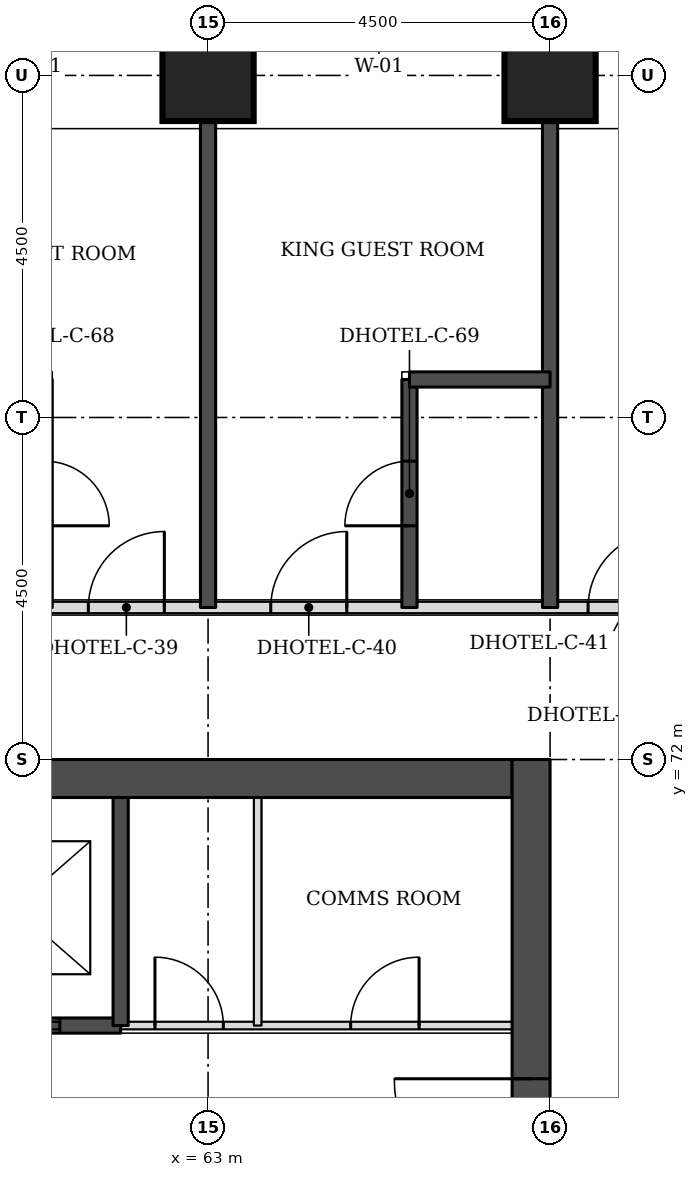
"""IFC4 building model, lengths in metres.
Left out: names, types, materials, properties, quantities, classifications, styles, units other than length and angle.
Written with IfcOpenShell. Run it as: python <this file> out.ifc"""

import sys

from ifc_helpers import new_model, si_unit, direction, frame, frame_2d, origin, origin_2d, place, context, subcontext, project, spatial, rectangle, extrude, element, fill, save


model = new_model("IFC4")
c1 = context("Model", 3, precision=1e-05, world=origin(), true_north=direction((0.0, 1.0)))
c2 = subcontext(c1, "Body", "Model", "MODEL_VIEW")
j1 = project(units=[si_unit("LENGTHUNIT", "METRE"), si_unit("PLANEANGLEUNIT", "RADIAN")], contexts=[c1])
p1 = place(None, origin())
s1 = spatial("IfcSite", under=j1, at=p1, CompositionType="ELEMENT")
p2 = place(p1, origin())
s2 = spatial("IfcBuilding", under=s1, at=p2, CompositionType="ELEMENT")
p3 = place(p2, frame((0.0, 0.0, 33.0)))
s3 = spatial("IfcBuildingStorey", under=s2, at=p3, CompositionType="ELEMENT", Elevation=33.0)
for number, where, z_axis, x_axis in (
    (1, (63.0, 81.0, 0.0), (0.0, 0.0, 1.0), (1.0, 0.0, 0.0)),
    (2, (67.5, 81.0, 0.0), (0.0, 0.0, 1.0), (1.0, 0.0, 0.0)),
):
    element("IfcColumn", number, at=place(p3, frame(where, z_axis=z_axis, x_axis=x_axis)), inside=s3, PredefinedType="COLUMN", context=c2, shape_type="SweptSolid", body=[
        extrude(rectangle(XDim=1.2, YDim=1.2, at=origin_2d()), origin(), (0.0, 0.0, 1.0), 3.3),
    ])
p4 = place(p3, frame((45.5, 71.75, 0.0), z_axis=(0.0, 0.0, 1.0), x_axis=(1.0, 0.0, 0.0)))
e3 = element("IfcWall", 3, at=p4, inside=s3, PredefinedType="SHEAR", context=c2, shape_type="SweptSolid", body=[
    extrude(rectangle(XDim=21.5, YDim=0.5, at=frame_2d((10.75, 0.0))), origin(), (0.0, 0.0, 1.0), 3.3),
])
p5 = place(p3, frame((67.25, 49.5, 0.0), z_axis=(0.0, 0.0, 1.0), x_axis=(0.0, 1.0, 0.0)))
e4 = element("IfcWall", 4, at=p5, inside=s3, PredefinedType="SHEAR", context=c2, shape_type="SweptSolid", body=[
    extrude(rectangle(XDim=22.5, YDim=0.5, at=frame_2d((11.25, 0.0))), origin(), (0.0, 0.0, 1.0), 3.3),
])
p6 = place(p5, frame((4.2, 0.0, 0.0)))
e5 = element("IfcOpeningElement", 5, at=p6, cuts=e4, PredefinedType="OPENING", context=c2, shape_type="SweptSolid", body=[
    extrude(rectangle(XDim=1.8, YDim=2.1, at=frame_2d((0.9, 1.05))), frame((0.0, 0.26, 0.0), z_axis=(0.0, -1.0, 0.0), x_axis=(1.0, 0.0, 0.0)), (0.0, 0.0, 1.0), 0.52),
])
p7 = place(p5, frame((6.9, 0.0, 0.0)))
e6 = element("IfcOpeningElement", 6, at=p7, cuts=e4, PredefinedType="OPENING", context=c2, shape_type="SweptSolid", body=[
    extrude(rectangle(XDim=1.1, YDim=2.1, at=frame_2d((0.55, 1.05))), frame((0.0, 0.26, 0.0), z_axis=(0.0, -1.0, 0.0), x_axis=(1.0, 0.0, 0.0)), (0.0, 0.0, 1.0), 0.52),
])
p8 = place(p5, frame((13.6, 0.0, 0.0)))
e7 = element("IfcOpeningElement", 7, at=p8, cuts=e4, PredefinedType="OPENING", context=c2, shape_type="SweptSolid", body=[
    extrude(rectangle(XDim=1.1, YDim=2.1, at=frame_2d((0.55, 1.05))), frame((0.0, 0.26, 0.0), z_axis=(0.0, -1.0, 0.0), x_axis=(1.0, 0.0, 0.0)), (0.0, 0.0, 1.0), 0.52),
])
p9 = place(p5, frame((16.5, 0.0, 0.0)))
e8 = element("IfcOpeningElement", 8, at=p9, cuts=e4, PredefinedType="OPENING", context=c2, shape_type="SweptSolid", body=[
    extrude(rectangle(XDim=1.8, YDim=2.1, at=frame_2d((0.9, 1.05))), frame((0.0, 0.26, 0.0), z_axis=(0.0, -1.0, 0.0), x_axis=(1.0, 0.0, 0.0)), (0.0, 0.0, 1.0), 0.52),
])
p10 = place(p3, frame((43.0, 74.0, 0.0), z_axis=(0.0, 0.0, 1.0), x_axis=(1.0, 0.0, 0.0)))
e9 = element("IfcWall", 9, at=p10, inside=s3, PredefinedType="PARTITIONING", context=c2, shape_type="SweptSolid", body=[
    extrude(rectangle(XDim=26.5, YDim=0.15, at=frame_2d((13.25, 0.0))), origin(), (0.0, 0.0, 1.0), 3.08),
])
p11 = place(p10, frame((2.825, 0.0, 0.0)))
e10 = element("IfcOpeningElement", 10, at=p11, cuts=e9, PredefinedType="OPENING", context=c2, shape_type="SweptSolid", body=[
    extrude(rectangle(XDim=1.0, YDim=2.1, at=frame_2d((0.5, 1.05))), frame((0.0, 0.085, 0.0), z_axis=(0.0, -1.0, 0.0), x_axis=(1.0, 0.0, 0.0)), (0.0, 0.0, 1.0), 0.17),
])
p12 = place(p10, frame((9.425, 0.0, 0.0)))
e11 = element("IfcOpeningElement", 11, at=p12, cuts=e9, PredefinedType="OPENING", context=c2, shape_type="SweptSolid", body=[
    extrude(rectangle(XDim=1.0, YDim=2.1, at=frame_2d((0.5, 1.05))), frame((0.0, 0.085, 0.0), z_axis=(0.0, -1.0, 0.0), x_axis=(1.0, 0.0, 0.0)), (0.0, 0.0, 1.0), 0.17),
])
p13 = place(p10, frame((11.825, 0.0, 0.0)))
e12 = element("IfcOpeningElement", 12, at=p13, cuts=e9, PredefinedType="OPENING", context=c2, shape_type="SweptSolid", body=[
    extrude(rectangle(XDim=1.0, YDim=2.1, at=frame_2d((0.5, 1.05))), frame((0.0, 0.085, 0.0), z_axis=(0.0, -1.0, 0.0), x_axis=(1.0, 0.0, 0.0)), (0.0, 0.0, 1.0), 0.17),
])
p14 = place(p10, frame((18.425, 0.0, 0.0)))
e13 = element("IfcOpeningElement", 13, at=p14, cuts=e9, PredefinedType="OPENING", context=c2, shape_type="SweptSolid", body=[
    extrude(rectangle(XDim=1.0, YDim=2.1, at=frame_2d((0.5, 1.05))), frame((0.0, 0.085, 0.0), z_axis=(0.0, -1.0, 0.0), x_axis=(1.0, 0.0, 0.0)), (0.0, 0.0, 1.0), 0.17),
])
p15 = place(p10, frame((20.825, 0.0, 0.0)))
e14 = element("IfcOpeningElement", 14, at=p15, cuts=e9, PredefinedType="OPENING", context=c2, shape_type="SweptSolid", body=[
    extrude(rectangle(XDim=1.0, YDim=2.1, at=frame_2d((0.5, 1.05))), frame((0.0, 0.085, 0.0), z_axis=(0.0, -1.0, 0.0), x_axis=(1.0, 0.0, 0.0)), (0.0, 0.0, 1.0), 0.17),
])
p16 = place(p10, frame((0.5, 0.0, 0.0)))
e15 = element("IfcOpeningElement", 15, at=p16, cuts=e9, PredefinedType="OPENING", context=c2, shape_type="SweptSolid", body=[
    extrude(rectangle(XDim=1.0, YDim=2.1, at=frame_2d((0.5, 1.05))), frame((0.0, 0.085, 0.0), z_axis=(0.0, -1.0, 0.0), x_axis=(1.0, 0.0, 0.0)), (0.0, 0.0, 1.0), 0.17),
])
p17 = place(p10, frame((25.0, 0.0, 0.0)))
e16 = element("IfcOpeningElement", 16, at=p17, cuts=e9, PredefinedType="OPENING", context=c2, shape_type="SweptSolid", body=[
    extrude(rectangle(XDim=1.0, YDim=2.1, at=frame_2d((0.5, 1.05))), frame((0.0, 0.085, 0.0), z_axis=(0.0, -1.0, 0.0), x_axis=(1.0, 0.0, 0.0)), (0.0, 0.0, 1.0), 0.17),
])
p18 = place(p3, frame((60.85, 74.0, 0.0), z_axis=(0.0, 0.0, 1.0), x_axis=(0.0, 1.0, 0.0)))
e17 = element("IfcWall", 17, at=p18, inside=s3, PredefinedType="SOLIDWALL", context=c2, shape_type="SweptSolid", body=[
    extrude(rectangle(XDim=3.0, YDim=0.2, at=frame_2d((1.5, 0.0))), origin(), (0.0, 0.0, 1.0), 3.08),
])
p19 = place(p18, frame((1.075, 0.0, 0.0)))
e18 = element("IfcOpeningElement", 18, at=p19, cuts=e17, PredefinedType="OPENING", context=c2, shape_type="SweptSolid", body=[
    extrude(rectangle(XDim=0.85, YDim=2.1, at=frame_2d((0.425, 1.05))), frame((0.0, 0.11, 0.0), z_axis=(0.0, -1.0, 0.0), x_axis=(1.0, 0.0, 0.0)), (0.0, 0.0, 1.0), 0.22),
])
p20 = place(p3, frame((63.0, 74.0, 0.0), z_axis=(0.0, 0.0, 1.0), x_axis=(0.0, 1.0, 0.0)))
e19 = element("IfcWall", 19, at=p20, inside=s3, PredefinedType="SOLIDWALL", context=c2, shape_type="SweptSolid", body=[
    extrude(rectangle(XDim=6.4, YDim=0.2, at=frame_2d((3.2, 0.0))), origin(), (0.0, 0.0, 1.0), 3.08),
])
p21 = place(p3, frame((65.65, 74.0, 0.0), z_axis=(0.0, 0.0, 1.0), x_axis=(0.0, 1.0, 0.0)))
e20 = element("IfcWall", 20, at=p21, inside=s3, PredefinedType="SOLIDWALL", context=c2, shape_type="SweptSolid", body=[
    extrude(rectangle(XDim=3.0, YDim=0.2, at=frame_2d((1.5, 0.0))), origin(), (0.0, 0.0, 1.0), 3.08),
])
p22 = place(p21, frame((1.075, 0.0, 0.0)))
e21 = element("IfcOpeningElement", 21, at=p22, cuts=e20, PredefinedType="OPENING", context=c2, shape_type="SweptSolid", body=[
    extrude(rectangle(XDim=0.85, YDim=2.1, at=frame_2d((0.425, 1.05))), frame((0.0, 0.11, 0.0), z_axis=(0.0, -1.0, 0.0), x_axis=(1.0, 0.0, 0.0)), (0.0, 0.0, 1.0), 0.22),
])
p23 = place(p3, frame((67.5, 74.0, 0.0), z_axis=(0.0, 0.0, 1.0), x_axis=(0.0, 1.0, 0.0)))
e22 = element("IfcWall", 22, at=p23, inside=s3, PredefinedType="SOLIDWALL", context=c2, shape_type="SweptSolid", body=[
    extrude(rectangle(XDim=6.4, YDim=0.2, at=frame_2d((3.2, 0.0))), origin(), (0.0, 0.0, 1.0), 3.08),
])
p24 = place(p3, frame((65.65, 77.0, 0.0), z_axis=(0.0, 0.0, 1.0), x_axis=(1.0, 0.0, 0.0)))
e23 = element("IfcWall", 23, at=p24, inside=s3, PredefinedType="SOLIDWALL", context=c2, shape_type="SweptSolid", body=[
    extrude(rectangle(XDim=1.85, YDim=0.2, at=frame_2d((0.925, 0.0))), origin(), (0.0, 0.0, 1.0), 3.08),
])
p25 = place(p3, frame((61.85, 68.5, 0.0), z_axis=(0.0, 0.0, 1.0), x_axis=(1.0, 0.0, 0.0)))
e24 = element("IfcWall", 24, at=p25, inside=s3, PredefinedType="PARTITIONING", context=c2, shape_type="SweptSolid", body=[
    extrude(rectangle(XDim=5.15, YDim=0.1, at=frame_2d((2.575, 0.0))), origin(), (0.0, 0.0, 1.0), 3.08),
])
p26 = place(p25, frame((3.026, 0.0, 0.0)))
e25 = element("IfcOpeningElement", 25, at=p26, cuts=e24, PredefinedType="OPENING", context=c2, shape_type="SweptSolid", body=[
    extrude(rectangle(XDim=0.9, YDim=2.1, at=frame_2d((0.45, 1.05))), frame((0.0, 0.06, 0.0), z_axis=(0.0, -1.0, 0.0), x_axis=(1.0, 0.0, 0.0)), (0.0, 0.0, 1.0), 0.12),
])
p27 = place(p25, frame((0.451, 0.0, 0.0)))
e26 = element("IfcOpeningElement", 26, at=p27, cuts=e24, PredefinedType="OPENING", context=c2, shape_type="SweptSolid", body=[
    extrude(rectangle(XDim=0.9, YDim=2.1, at=frame_2d((0.45, 1.05))), frame((0.0, 0.06, 0.0), z_axis=(0.0, -1.0, 0.0), x_axis=(1.0, 0.0, 0.0)), (0.0, 0.0, 1.0), 0.12),
])
p28 = place(p3, frame((50.65, 68.5, 0.0), z_axis=(0.0, 0.0, 1.0), x_axis=(1.0, 0.0, 0.0)))
e27 = element("IfcWall", 27, at=p28, inside=s3, PredefinedType="SOLIDWALL", context=c2, shape_type="SweptSolid", body=[
    extrude(rectangle(XDim=11.2, YDim=0.2, at=frame_2d((5.6, 0.0))), origin(), (0.0, 0.0, 1.0), 3.08),
])
p29 = place(p28, frame((0.8, 0.0, 0.0)))
e28 = element("IfcOpeningElement", 28, at=p29, cuts=e27, PredefinedType="OPENING", context=c2, shape_type="SweptSolid", body=[
    extrude(rectangle(XDim=1.2, YDim=2.1, at=frame_2d((0.6, 1.05))), frame((0.0, 0.11, 0.0), z_axis=(0.0, -1.0, 0.0), x_axis=(1.0, 0.0, 0.0)), (0.0, 0.0, 1.0), 0.22),
])
p30 = place(p28, frame((3.6, 0.0, 0.0)))
e29 = element("IfcOpeningElement", 29, at=p30, cuts=e27, PredefinedType="OPENING", context=c2, shape_type="SweptSolid", body=[
    extrude(rectangle(XDim=1.2, YDim=2.1, at=frame_2d((0.6, 1.05))), frame((0.0, 0.11, 0.0), z_axis=(0.0, -1.0, 0.0), x_axis=(1.0, 0.0, 0.0)), (0.0, 0.0, 1.0), 0.22),
])
p31 = place(p28, frame((6.4, 0.0, 0.0)))
e30 = element("IfcOpeningElement", 30, at=p31, cuts=e27, PredefinedType="OPENING", context=c2, shape_type="SweptSolid", body=[
    extrude(rectangle(XDim=1.2, YDim=2.1, at=frame_2d((0.6, 1.05))), frame((0.0, 0.11, 0.0), z_axis=(0.0, -1.0, 0.0), x_axis=(1.0, 0.0, 0.0)), (0.0, 0.0, 1.0), 0.22),
])
p32 = place(p28, frame((9.2, 0.0, 0.0)))
e31 = element("IfcOpeningElement", 31, at=p32, cuts=e27, PredefinedType="OPENING", context=c2, shape_type="SweptSolid", body=[
    extrude(rectangle(XDim=1.2, YDim=2.1, at=frame_2d((0.6, 1.05))), frame((0.0, 0.11, 0.0), z_axis=(0.0, -1.0, 0.0), x_axis=(1.0, 0.0, 0.0)), (0.0, 0.0, 1.0), 0.22),
])
p33 = place(p3, frame((61.85, 68.5, 0.0), z_axis=(0.0, 0.0, 1.0), x_axis=(0.0, 1.0, 0.0)))
e32 = element("IfcWall", 32, at=p33, inside=s3, PredefinedType="SOLIDWALL", context=c2, shape_type="SweptSolid", body=[
    extrude(rectangle(XDim=3.0, YDim=0.2, at=frame_2d((1.5, 0.0))), origin(), (0.0, 0.0, 1.0), 3.08),
])
p34 = place(p3, frame((63.653, 68.5, 0.0), z_axis=(0.0, 0.0, 1.0), x_axis=(0.0, 1.0, 0.0)))
e33 = element("IfcWall", 33, at=p34, inside=s3, PredefinedType="PARTITIONING", context=c2, shape_type="SweptSolid", body=[
    extrude(rectangle(XDim=3.0, YDim=0.1, at=frame_2d((1.5, 0.0))), origin(), (0.0, 0.0, 1.0), 3.08),
])
p35 = place(p14, origin())
e34 = element("IfcDoor", 34, at=p35, inside=s3, OperationType="SINGLE_SWING_RIGHT", PredefinedType="DOOR", context=c2, shape_type="SweptSolid", body=[
    extrude(rectangle(XDim=1.0, YDim=2.1, at=frame_2d((0.5, 1.05))), frame((0.0, 0.025, 0.0), z_axis=(0.0, -1.0, 0.0), x_axis=(1.0, 0.0, 0.0)), (0.0, 0.0, 1.0), 0.05),
])
fill(e13, e34)
p36 = place(p15, origin())
e35 = element("IfcDoor", 35, at=p36, inside=s3, OperationType="SINGLE_SWING_RIGHT", PredefinedType="DOOR", context=c2, shape_type="SweptSolid", body=[
    extrude(rectangle(XDim=1.0, YDim=2.1, at=frame_2d((0.5, 1.05))), frame((0.0, 0.025, 0.0), z_axis=(0.0, -1.0, 0.0), x_axis=(1.0, 0.0, 0.0)), (0.0, 0.0, 1.0), 0.05),
])
fill(e14, e35)
p37 = place(p22, origin())
e36 = element("IfcDoor", 36, at=p37, inside=s3, OperationType="SINGLE_SWING_LEFT", PredefinedType="DOOR", context=c2, shape_type="SweptSolid", body=[
    extrude(rectangle(XDim=0.85, YDim=2.1, at=frame_2d((0.425, 1.05))), frame((0.0, 0.025, 0.0), z_axis=(0.0, -1.0, 0.0), x_axis=(1.0, 0.0, 0.0)), (0.0, 0.0, 1.0), 0.05),
])
fill(e21, e36)
p38 = place(p17, origin())
e37 = element("IfcDoor", 37, at=p38, inside=s3, OperationType="SINGLE_SWING_RIGHT", PredefinedType="DOOR", context=c2, shape_type="SweptSolid", body=[
    extrude(rectangle(XDim=1.0, YDim=2.1, at=frame_2d((0.5, 1.05))), frame((0.0, 0.025, 0.0), z_axis=(0.0, -1.0, 0.0), x_axis=(1.0, 0.0, 0.0)), (0.0, 0.0, 1.0), 0.05),
])
fill(e16, e37)
p39 = place(p32, origin())
e38 = element("IfcDoor", 38, at=p39, inside=s3, OperationType="DOUBLE_DOOR_SLIDING", PredefinedType="DOOR", context=c2, shape_type="SweptSolid", body=[
    extrude(rectangle(XDim=1.2, YDim=2.1, at=frame_2d((0.6, 1.05))), frame((0.0, 0.025, 0.0), z_axis=(0.0, -1.0, 0.0), x_axis=(1.0, 0.0, 0.0)), (0.0, 0.0, 1.0), 0.05),
])
fill(e31, e38)
p40 = place(p9, origin())
e39 = element("IfcDoor", 39, at=p40, inside=s3, OperationType="SINGLE_SWING_RIGHT", PredefinedType="DOOR", context=c2, shape_type="SweptSolid", body=[
    extrude(rectangle(XDim=1.8, YDim=2.1, at=frame_2d((0.9, 1.05))), frame((0.0, 0.025, 0.0), z_axis=(0.0, -1.0, 0.0), x_axis=(1.0, 0.0, 0.0)), (0.0, 0.0, 1.0), 0.05),
])
fill(e8, e39)
p41 = place(p26, origin())
e40 = element("IfcDoor", 40, at=p41, inside=s3, OperationType="SINGLE_SWING_RIGHT", PredefinedType="DOOR", context=c2, shape_type="SweptSolid", body=[
    extrude(rectangle(XDim=0.9, YDim=2.1, at=frame_2d((0.45, 1.05))), frame((0.0, 0.025, 0.0), z_axis=(0.0, -1.0, 0.0), x_axis=(1.0, 0.0, 0.0)), (0.0, 0.0, 1.0), 0.05),
])
fill(e25, e40)
p42 = place(p27, origin())
e41 = element("IfcDoor", 41, at=p42, inside=s3, OperationType="SINGLE_SWING_LEFT", PredefinedType="DOOR", context=c2, shape_type="SweptSolid", body=[
    extrude(rectangle(XDim=0.9, YDim=2.1, at=frame_2d((0.45, 1.05))), frame((0.0, 0.025, 0.0), z_axis=(0.0, -1.0, 0.0), x_axis=(1.0, 0.0, 0.0)), (0.0, 0.0, 1.0), 0.05),
])
fill(e26, e41)
save(model, sys.argv[1])
